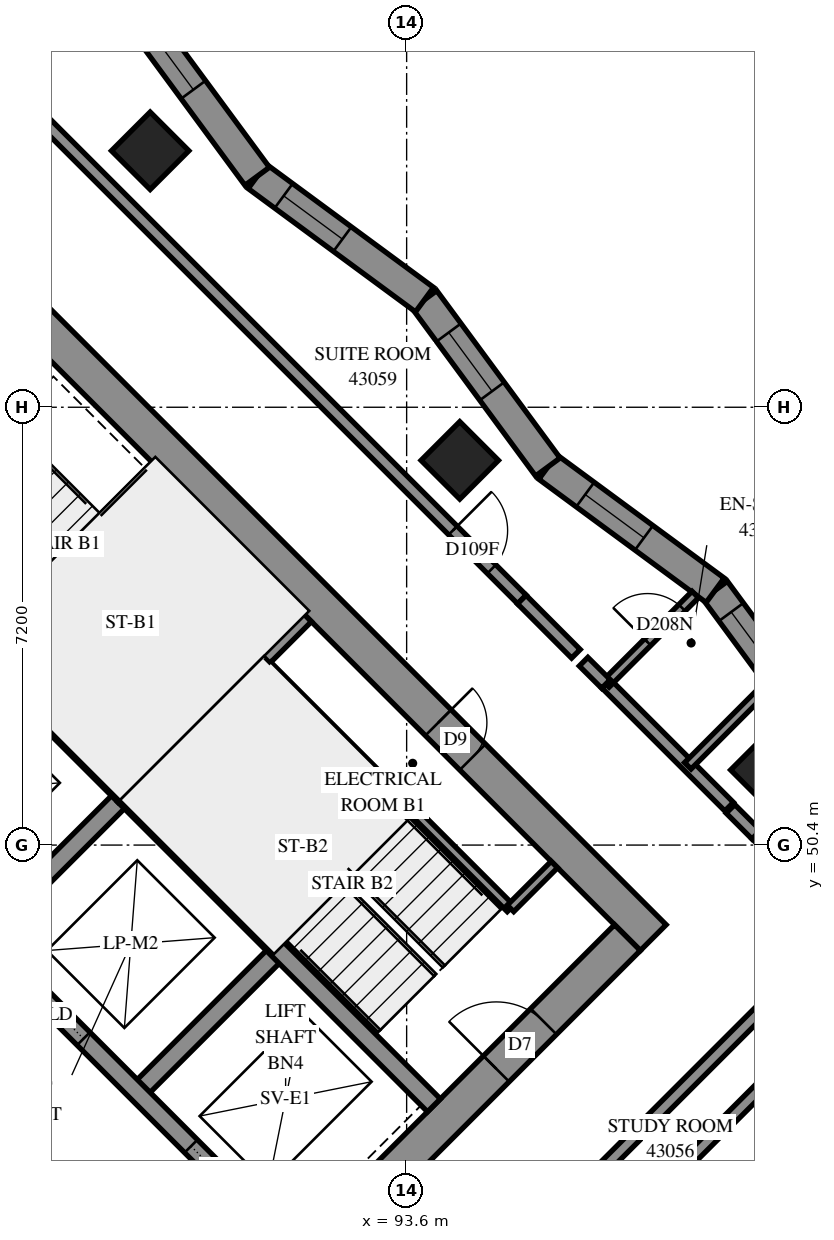
"""IFC4 building model, lengths in metres.
Left out: names, types, materials, properties, quantities, classifications, styles, units other than length and angle.
Written with IfcOpenShell. Run it as: python <this file> out.ifc"""

import sys

from ifc_helpers import new_model, si_unit, direction, frame, frame_2d, origin, origin_2d, place, context, subcontext, project, spatial, polyline, rectangle, outline, extrude, element, fill, save


model = new_model("IFC4")
c1 = context("Model", 3, precision=1e-05, world=origin(), true_north=direction((0.0, 1.0)))
c2 = subcontext(c1, "Body", "Model", "MODEL_VIEW")
j1 = project(units=[si_unit("LENGTHUNIT", "METRE"), si_unit("PLANEANGLEUNIT", "RADIAN")], contexts=[c1])
p1 = place(None, origin())
s1 = spatial("IfcSite", under=j1, at=p1, CompositionType="ELEMENT")
p2 = place(p1, origin())
s2 = spatial("IfcBuilding", under=s1, at=p2, CompositionType="ELEMENT")
p3 = place(p2, frame((0.0, 0.0, 159.2)))
s3 = spatial("IfcBuildingStorey", under=s2, at=p3, CompositionType="ELEMENT", Elevation=159.2)
for number, where, z_axis, x_axis in (
    (1, (89.382, 61.818, 0.0), (0.0, 0.0, 1.0), (0.707, -0.707, 0.0)),
    (2, (94.474, 56.727, 0.0), (0.0, 0.0, 1.0), (0.707, -0.707, 0.0)),
    (3, (99.565, 51.635, 0.0), (0.0, 0.0, 1.0), (0.707, -0.707, 0.0)),
):
    element("IfcColumn", number, at=place(p3, frame(where, z_axis=z_axis, x_axis=x_axis)), inside=s3, PredefinedType="COLUMN", context=c2, shape_type="SweptSolid", body=[
        extrude(rectangle(XDim=0.9, YDim=0.9, at=origin_2d()), origin(), (0.0, 0.0, 1.0), 3.1),
    ])
p4 = place(p3, frame((86.625, 59.908, -0.3), z_axis=(0.0, 0.0, 1.0), x_axis=(0.7071067812, -0.7071067812, 0.0)))
e4 = element("IfcWall", 4, at=p4, inside=s3, PredefinedType="SHEAR", context=c2, shape_type="SweptSolid", body=[
    extrude(rectangle(XDim=15.6, YDim=0.6, at=frame_2d((7.8, 0.0))), origin(), (0.0, 0.0, 1.0), 2.7),
])
p5 = place(p4, frame((10.6, 0.0, 0.3)))
e5 = element("IfcOpeningElement", 5, at=p5, cuts=e4, PredefinedType="OPENING", context=c2, shape_type="SweptSolid", body=[
    extrude(rectangle(XDim=0.8, YDim=2.1, at=frame_2d((0.4, 1.05))), frame((0.0, 0.31, 0.0), z_axis=(0.0, -1.0, 0.0), x_axis=(1.0, 0.0, 0.0)), (0.0, 0.0, 1.0), 0.62),
])
p6 = place(p3, frame((87.049, 38.695, -0.3), z_axis=(0.0, 0.0, 1.0), x_axis=(0.7071067812, 0.7071067812, 0.0)))
e6 = element("IfcWall", 6, at=p6, inside=s3, PredefinedType="SHEAR", context=c2, shape_type="SweptSolid", body=[
    extrude(rectangle(XDim=14.4, YDim=0.6, at=frame_2d((7.2, 0.0))), origin(), (0.0, 0.0, 1.0), 2.7),
])
p7 = place(p6, frame((4.55, 0.0, 0.3)))
e7 = element("IfcOpeningElement", 7, at=p7, cuts=e6, PredefinedType="OPENING", context=c2, shape_type="SweptSolid", body=[
    extrude(rectangle(XDim=1.1, YDim=2.1, at=frame_2d((0.55, 1.05))), frame((0.0, 0.31, 0.0), z_axis=(0.0, -1.0, 0.0), x_axis=(1.0, 0.0, 0.0)), (0.0, 0.0, 1.0), 0.62),
])
p8 = place(p6, frame((11.35, 0.0, 0.3)))
e8 = element("IfcOpeningElement", 8, at=p8, cuts=e6, PredefinedType="OPENING", context=c2, shape_type="SweptSolid", body=[
    extrude(rectangle(XDim=1.1, YDim=2.1, at=frame_2d((0.55, 1.05))), frame((0.0, 0.31, 0.0), z_axis=(0.0, -1.0, 0.0), x_axis=(1.0, 0.0, 0.0)), (0.0, 0.0, 1.0), 0.62),
])
for number, where, z_axis, x_axis in (
    (9, (86.625, 48.878, 0.0), (0.0, 0.0, 1.0), (0.707, 0.707, 0.0)),
    (10, (89.17, 46.332, 0.0), (0.0, 0.0, 1.0), (0.707, 0.707, 0.0)),
):
    element("IfcWall", number, at=place(p3, frame(where, z_axis=z_axis, x_axis=x_axis)), inside=s3, PredefinedType="SOLIDWALL", context=c2, shape_type="SweptSolid", body=[
        extrude(rectangle(XDim=3.3, YDim=0.3, at=frame_2d((1.65, 0.0))), origin(), (0.0, 0.0, 1.0), 3.1),
    ])
p9 = place(p3, frame((78.988, 51.423, 0.0), z_axis=(0.0, 0.0, 1.0), x_axis=(0.7071067812, -0.7071067812, 0.0)))
e11 = element("IfcWall", 11, at=p9, inside=s3, PredefinedType="SOLIDWALL", context=c2, shape_type="SweptSolid", body=[
    extrude(rectangle(XDim=14.4, YDim=0.3, at=frame_2d((7.2, 0.0))), origin(), (0.0, 0.0, 1.0), 3.1),
])
p10 = place(p9, frame((1.35, 0.0, 0.0)))
e12 = element("IfcOpeningElement", 12, at=p10, cuts=e11, PredefinedType="OPENING", context=c2, shape_type="SweptSolid", body=[
    extrude(rectangle(XDim=0.9, YDim=2.1, at=frame_2d((0.45, 1.05))), frame((0.0, 0.16, 0.0), z_axis=(0.0, -1.0, 0.0), x_axis=(1.0, 0.0, 0.0)), (0.0, 0.0, 1.0), 0.32),
])
p11 = place(p9, frame((4.95, 0.0, 0.0)))
e13 = element("IfcOpeningElement", 13, at=p11, cuts=e11, PredefinedType="OPENING", context=c2, shape_type="SweptSolid", body=[
    extrude(rectangle(XDim=0.9, YDim=2.1, at=frame_2d((0.45, 1.05))), frame((0.0, 0.16, 0.0), z_axis=(0.0, -1.0, 0.0), x_axis=(1.0, 0.0, 0.0)), (0.0, 0.0, 1.0), 0.32),
])
p12 = place(p9, frame((8.55, 0.0, 0.0)))
e14 = element("IfcOpeningElement", 14, at=p12, cuts=e11, PredefinedType="OPENING", context=c2, shape_type="SweptSolid", body=[
    extrude(rectangle(XDim=0.9, YDim=2.1, at=frame_2d((0.45, 1.05))), frame((0.0, 0.16, 0.0), z_axis=(0.0, -1.0, 0.0), x_axis=(1.0, 0.0, 0.0)), (0.0, 0.0, 1.0), 0.32),
])
p13 = place(p9, frame((12.05, 0.0, 0.0)))
e15 = element("IfcOpeningElement", 15, at=p13, cuts=e11, PredefinedType="OPENING", context=c2, shape_type="SweptSolid", body=[
    extrude(rectangle(XDim=1.1, YDim=2.1, at=frame_2d((0.55, 1.05))), frame((0.0, 0.16, 0.0), z_axis=(0.0, -1.0, 0.0), x_axis=(1.0, 0.0, 0.0)), (0.0, 0.0, 1.0), 0.32),
])
p14 = place(p3, frame((81.534, 53.969, 0.0), z_axis=(0.0, 0.0, 1.0), x_axis=(0.707103309, -0.7071102534, 0.0)))
e16 = element("IfcWall", 16, at=p14, inside=s3, PredefinedType="SOLIDWALL", context=c2, shape_type="SweptSolid", body=[
    extrude(rectangle(XDim=14.4, YDim=0.3, at=frame_2d((7.2, 0.0))), origin(), (0.0, 0.0, 1.0), 3.1),
])
p15 = place(p14, frame((1.25, 0.0, 0.0)))
e17 = element("IfcOpeningElement", 17, at=p15, cuts=e16, PredefinedType="OPENING", context=c2, shape_type="SweptSolid", body=[
    extrude(rectangle(XDim=1.1, YDim=2.1, at=frame_2d((0.55, 1.05))), frame((0.0, 0.16, 0.0), z_axis=(0.0, -1.0, 0.0), x_axis=(1.0, 0.0, 0.0)), (0.0, 0.0, 1.0), 0.32),
])
p16 = place(p14, frame((4.85, 0.0, 0.0)))
e18 = element("IfcOpeningElement", 18, at=p16, cuts=e16, PredefinedType="OPENING", context=c2, shape_type="SweptSolid", body=[
    extrude(rectangle(XDim=1.1, YDim=2.1, at=frame_2d((0.55, 1.05))), frame((0.0, 0.16, 0.0), z_axis=(0.0, -1.0, 0.0), x_axis=(1.0, 0.0, 0.0)), (0.0, 0.0, 1.0), 0.32),
])
p17 = place(p14, frame((8.45, 0.0, 0.0)))
e19 = element("IfcOpeningElement", 19, at=p17, cuts=e16, PredefinedType="OPENING", context=c2, shape_type="SweptSolid", body=[
    extrude(rectangle(XDim=1.1, YDim=2.1, at=frame_2d((0.55, 1.05))), frame((0.0, 0.16, 0.0), z_axis=(0.0, -1.0, 0.0), x_axis=(1.0, 0.0, 0.0)), (0.0, 0.0, 1.0), 0.32),
])
p18 = place(p14, frame((12.05, 0.0, 0.0)))
e20 = element("IfcOpeningElement", 20, at=p18, cuts=e16, PredefinedType="OPENING", context=c2, shape_type="SweptSolid", body=[
    extrude(rectangle(XDim=1.1, YDim=2.1, at=frame_2d((0.55, 1.05))), frame((0.0, 0.16, 0.0), z_axis=(0.0, -1.0, 0.0), x_axis=(1.0, 0.0, 0.0)), (0.0, 0.0, 1.0), 0.32),
])
for number, where, z_axis, x_axis in (
    (21, (83.867, 56.302, 0.0), (0.0, 0.0, 1.0), (0.707, -0.707, 0.0)),
    (22, (88.958, 51.211, 0.0), (0.0, 0.0, 1.0), (0.707, -0.707, 0.0)),
):
    element("IfcWall", number, at=place(p3, frame(where, z_axis=z_axis, x_axis=x_axis)), inside=s3, PredefinedType="SOLIDWALL", context=c2, shape_type="SweptSolid", body=[
        extrude(rectangle(XDim=7.2, YDim=0.3, at=frame_2d((3.6, 0.0))), origin(), (0.0, 0.0, 1.0), 3.1),
    ])
p19 = place(p3, frame((88.958, 51.211, 0.0), z_axis=(0.0, 0.0, 1.0), x_axis=(0.7071067812, 0.7071067812, 0.0)))
e23 = element("IfcWall", 23, at=p19, inside=s3, PredefinedType="SOLIDWALL", context=c2, shape_type="SweptSolid", body=[
    extrude(rectangle(XDim=4.2, YDim=0.3, at=frame_2d((2.1, 0.0))), origin(), (0.0, 0.0, 1.0), 3.1),
])
p20 = place(p3, frame((100.702, 51.838, 0.0), z_axis=(0.0, 0.0, 1.0), x_axis=(-0.5932199928, 0.8050403966, 0.0)))
e24 = element("IfcWall", 24, at=p20, inside=s3, PredefinedType="SOLIDWALL", context=c2, shape_type="SweptSolid", body=[
    extrude(outline(polyline([(0.038, -0.25), (3.456, -0.25), (3.381, 0.25), (-0.038, 0.25), (0.038, -0.25)])), origin(), (0.0, 0.0, 1.0), 3.1),
])
p21 = place(p20, frame((1.774, 0.0, 0.45)))
e25 = element("IfcOpeningElement", 25, at=p21, cuts=e24, PredefinedType="OPENING", context=c2, shape_type="SweptSolid", body=[
    extrude(rectangle(XDim=1.2, YDim=2.5, at=frame_2d((0.6, 1.25))), frame((0.0, 0.26, 0.0), z_axis=(0.0, -1.0, 0.0), x_axis=(1.0, 0.0, 0.0)), (0.0, 0.0, 1.0), 0.52),
])
p22 = place(p3, frame((98.674, 54.59, 0.0), z_axis=(0.0, 0.0, 1.0), x_axis=(-0.8050440725, 0.5932150043, 0.0)))
e26 = element("IfcWall", 26, at=p22, inside=s3, PredefinedType="SOLIDWALL", context=c2, shape_type="SweptSolid", body=[
    extrude(outline(polyline([(-0.038, -0.25), (3.381, -0.25), (3.456, 0.25), (0.038, 0.25), (-0.038, -0.25)])), origin(), (0.0, 0.0, 1.0), 3.1),
])
p23 = place(p22, frame((1.455, 0.0, 0.45)))
e27 = element("IfcOpeningElement", 27, at=p23, cuts=e26, PredefinedType="OPENING", context=c2, shape_type="SweptSolid", body=[
    extrude(rectangle(XDim=1.2, YDim=2.5, at=frame_2d((0.6, 1.25))), frame((0.0, 0.26, 0.0), z_axis=(0.0, -1.0, 0.0), x_axis=(1.0, 0.0, 0.0)), (0.0, 0.0, 1.0), 0.52),
])
p24 = place(p3, frame((95.922, 56.618, 0.0), z_axis=(0.0, 0.0, 1.0), x_axis=(-0.5932150043, 0.8050440725, 0.0)))
e28 = element("IfcWall", 28, at=p24, inside=s3, PredefinedType="SOLIDWALL", context=c2, shape_type="SweptSolid", body=[
    extrude(outline(polyline([(0.038, -0.25), (3.456, -0.25), (3.381, 0.25), (-0.038, 0.25), (0.038, -0.25)])), origin(), (0.0, 0.0, 1.0), 3.1),
])
p25 = place(p24, frame((1.547, 0.0, 0.45)))
e29 = element("IfcOpeningElement", 29, at=p25, cuts=e28, PredefinedType="OPENING", context=c2, shape_type="SweptSolid", body=[
    extrude(rectangle(XDim=1.2, YDim=2.5, at=frame_2d((0.6, 1.25))), frame((0.0, 0.26, 0.0), z_axis=(0.0, -1.0, 0.0), x_axis=(1.0, 0.0, 0.0)), (0.0, 0.0, 1.0), 0.52),
])
p26 = place(p3, frame((93.894, 59.37, 0.0), z_axis=(0.0, 0.0, 1.0), x_axis=(-0.8050403966, 0.5932199928, 0.0)))
e30 = element("IfcWall", 30, at=p26, inside=s3, PredefinedType="SOLIDWALL", context=c2, shape_type="SweptSolid", body=[
    extrude(outline(polyline([(-0.038, -0.25), (3.381, -0.25), (3.456, 0.25), (0.038, 0.25), (-0.038, -0.25)])), origin(), (0.0, 0.0, 1.0), 3.1),
])
p27 = place(p26, frame((1.677, 0.0, 0.45)))
e31 = element("IfcOpeningElement", 31, at=p27, cuts=e30, PredefinedType="OPENING", context=c2, shape_type="SweptSolid", body=[
    extrude(rectangle(XDim=1.2, YDim=2.5, at=frame_2d((0.6, 1.25))), frame((0.0, 0.26, 0.0), z_axis=(0.0, -1.0, 0.0), x_axis=(1.0, 0.0, 0.0)), (0.0, 0.0, 1.0), 0.52),
])
p28 = place(p3, frame((91.142, 61.398, 0.0), z_axis=(0.0, 0.0, 1.0), x_axis=(-0.5932150043, 0.8050440725, 0.0)))
e32 = element("IfcWall", 32, at=p28, inside=s3, PredefinedType="SOLIDWALL", context=c2, shape_type="SweptSolid", body=[
    extrude(outline(polyline([(0.038, -0.25), (3.456, -0.25), (3.381, 0.25), (-0.038, 0.25), (0.038, -0.25)])), origin(), (0.0, 0.0, 1.0), 3.1),
])
p29 = place(p28, frame((1.77, 0.0, 0.45)))
e33 = element("IfcOpeningElement", 33, at=p29, cuts=e32, PredefinedType="OPENING", context=c2, shape_type="SweptSolid", body=[
    extrude(rectangle(XDim=1.2, YDim=2.5, at=frame_2d((0.6, 1.25))), frame((0.0, 0.26, 0.0), z_axis=(0.0, -1.0, 0.0), x_axis=(1.0, 0.0, 0.0)), (0.0, 0.0, 1.0), 0.52),
])
p30 = place(p3, frame((91.313, 53.354, 0.0), z_axis=(0.0, 0.0, 1.0), x_axis=(0.7071067812, -0.7071067812, 0.0)))
e34 = element("IfcWall", 34, at=p30, inside=s3, PredefinedType="PARTITIONING", context=c2, shape_type="SweptSolid", body=[
    extrude(rectangle(XDim=5.65, YDim=0.15, at=frame_2d((2.825, 0.0))), origin(), (0.0, 0.0, 1.0), 3.1),
])
p31 = place(p3, frame((95.308, 49.358, 0.0), z_axis=(0.0, 0.0, 1.0), x_axis=(0.70705776, 0.707155799, 0.0)))
e35 = element("IfcWall", 35, at=p31, inside=s3, PredefinedType="PARTITIONING", context=c2, shape_type="SweptSolid", body=[
    extrude(rectangle(XDim=1.02, YDim=0.15, at=frame_2d((0.51, 0.0))), origin(), (0.0, 0.0, 1.0), 3.1),
])
p32 = place(p3, frame((86.841, 63.093, 0.0), z_axis=(0.0, 0.0, 1.0), x_axis=(0.7071067812, -0.7071067812, 0.0)))
e36 = element("IfcWall", 36, at=p32, inside=s3, PredefinedType="PARTITIONING", context=c2, shape_type="SweptSolid", body=[
    extrude(rectangle(XDim=12.239, YDim=0.2, at=frame_2d((6.119, 0.0))), origin(), (0.0, 0.0, 1.0), 3.1),
])
p33 = place(p32, frame((10.634, 0.0, 0.0)))
e37 = element("IfcOpeningElement", 37, at=p33, cuts=e36, PredefinedType="OPENING", context=c2, shape_type="SweptSolid", body=[
    extrude(rectangle(XDim=0.9, YDim=2.1, at=frame_2d((0.45, 1.05))), frame((0.0, 0.11, 0.0), z_axis=(0.0, -1.0, 0.0), x_axis=(1.0, 0.0, 0.0)), (0.0, 0.0, 1.0), 0.22),
])
p34 = place(p3, frame((94.401, 41.383, 0.0), z_axis=(0.0, 0.0, 1.0), x_axis=(0.7071067812, 0.7071067812, 0.0)))
e38 = element("IfcWall", 38, at=p34, inside=s3, PredefinedType="PARTITIONING", context=c2, shape_type="SweptSolid", body=[
    extrude(rectangle(XDim=12.04, YDim=0.2, at=frame_2d((6.02, 0.0))), origin(), (0.0, 0.0, 1.0), 3.1),
])
p35 = place(p3, frame((93.767, 42.021, 0.0), z_axis=(0.0, 0.0, 1.0), x_axis=(0.7071067812, 0.7071067812, 0.0)))
e39 = element("IfcWall", 39, at=p35, inside=s3, PredefinedType="PARTITIONING", context=c2, shape_type="SweptSolid", body=[
    extrude(rectangle(XDim=9.998, YDim=0.2, at=frame_2d((4.999, 0.0))), origin(), (0.0, 0.0, 1.0), 3.1),
])
p36 = place(p35, frame((0.196, 0.0, 0.0)))
e40 = element("IfcOpeningElement", 40, at=p36, cuts=e39, PredefinedType="OPENING", context=c2, shape_type="SweptSolid", body=[
    extrude(rectangle(XDim=1.0, YDim=2.1, at=frame_2d((0.5, 1.05))), frame((0.0, 0.11, 0.0), z_axis=(0.0, -1.0, 0.0), x_axis=(1.0, 0.0, 0.0)), (0.0, 0.0, 1.0), 0.22),
])
p37 = place(p3, frame((96.882, 53.053, 0.0), z_axis=(0.0, 0.0, 1.0), x_axis=(0.7071067812, -0.7071067812, 0.0)))
e41 = element("IfcWall", 41, at=p37, inside=s3, PredefinedType="PARTITIONING", context=c2, shape_type="SweptSolid", body=[
    extrude(rectangle(XDim=2.86, YDim=0.2, at=frame_2d((1.43, 0.0))), origin(), (0.0, 0.0, 1.0), 3.1),
])
p38 = place(p3, frame((99.352, 50.574, 0.0), z_axis=(0.0, 0.0, 1.0), x_axis=(0.7075827869, -0.7066304548, 0.0)))
e42 = element("IfcWall", 42, at=p38, inside=s3, PredefinedType="PARTITIONING", context=c2, shape_type="SweptSolid", body=[
    extrude(rectangle(XDim=2.1, YDim=0.2, at=frame_2d((1.05, 0.0))), origin(), (0.0, 0.0, 1.0), 3.1),
])
p39 = place(p3, frame((96.877, 53.051, 0.0), z_axis=(0.0, 0.0, 1.0), x_axis=(0.7071067812, 0.7071067812, 0.0)))
e43 = element("IfcWall", 43, at=p39, inside=s3, PredefinedType="PARTITIONING", context=c2, shape_type="SweptSolid", body=[
    extrude(rectangle(XDim=2.078, YDim=0.15, at=frame_2d((1.039, 0.0))), origin(), (0.0, 0.0, 1.0), 3.1),
])
p40 = place(p39, frame((0.969, 0.0, 0.0)))
e44 = element("IfcOpeningElement", 44, at=p40, cuts=e43, PredefinedType="OPENING", context=c2, shape_type="SweptSolid", body=[
    extrude(rectangle(XDim=0.8, YDim=2.1, at=frame_2d((0.4, 1.05))), frame((0.0, 0.085, 0.0), z_axis=(0.0, -1.0, 0.0), x_axis=(1.0, 0.0, 0.0)), (0.0, 0.0, 1.0), 0.17),
])
p41 = place(p3, frame((98.224, 51.704, 0.0), z_axis=(0.0, 0.0, 1.0), x_axis=(0.7065103186, 0.7077027411, 0.0)))
e45 = element("IfcWall", 45, at=p41, inside=s3, PredefinedType="PARTITIONING", context=c2, shape_type="SweptSolid", body=[
    extrude(rectangle(XDim=1.845, YDim=0.15, at=frame_2d((0.922, 0.0))), origin(), (0.0, 0.0, 1.0), 3.1),
])
p42 = place(p3, frame((95.494, 54.438, 0.0), z_axis=(0.0, 0.0, 1.0), x_axis=(0.706312726, -0.7078999456, 0.0)))
e46 = element("IfcWall", 46, at=p42, inside=s3, PredefinedType="PARTITIONING", context=c2, shape_type="SweptSolid", body=[
    extrude(rectangle(XDim=1.26, YDim=0.2, at=frame_2d((0.63, 0.0))), origin(), (0.0, 0.0, 1.0), 3.1),
])
p43 = place(p3, frame((98.925, 50.995, 0.0), z_axis=(0.0, 0.0, 1.0), x_axis=(0.7071067812, -0.7071067812, 0.0)))
e47 = element("IfcWall", 47, at=p43, inside=s3, PredefinedType="PARTITIONING", context=c2, shape_type="SweptSolid", body=[
    extrude(rectangle(XDim=0.6, YDim=0.2, at=frame_2d((0.3, 0.0))), origin(), (0.0, 0.0, 1.0), 3.1),
])
p44 = place(p3, frame((96.51, 53.416, 0.0), z_axis=(0.0, 0.0, 1.0), x_axis=(0.7090308706, -0.7051774419, 0.0)))
e48 = element("IfcWall", 48, at=p44, inside=s3, PredefinedType="PARTITIONING", context=c2, shape_type="SweptSolid", body=[
    extrude(rectangle(XDim=0.519, YDim=0.2, at=frame_2d((0.26, 0.0))), origin(), (0.0, 0.0, 1.0), 3.1),
])
p45 = place(p21, origin())
e49 = element("IfcWindow", 49, at=p45, inside=s3, PartitioningType="SINGLE_PANEL", PredefinedType="WINDOW", context=c2, shape_type="SweptSolid", body=[
    extrude(rectangle(XDim=1.2, YDim=2.5, at=frame_2d((0.6, 1.25))), frame((0.0, 0.18, 0.0), z_axis=(0.0, -1.0, 0.0), x_axis=(1.0, 0.0, 0.0)), (0.0, 0.0, 1.0), 0.06),
])
fill(e25, e49)
p46 = place(p23, origin())
e50 = element("IfcWindow", 50, at=p46, inside=s3, PartitioningType="SINGLE_PANEL", PredefinedType="WINDOW", context=c2, shape_type="SweptSolid", body=[
    extrude(rectangle(XDim=1.2, YDim=2.5, at=frame_2d((0.6, 1.25))), frame((0.0, 0.18, 0.0), z_axis=(0.0, -1.0, 0.0), x_axis=(1.0, 0.0, 0.0)), (0.0, 0.0, 1.0), 0.06),
])
fill(e27, e50)
p47 = place(p25, origin())
e51 = element("IfcWindow", 51, at=p47, inside=s3, PartitioningType="SINGLE_PANEL", PredefinedType="WINDOW", context=c2, shape_type="SweptSolid", body=[
    extrude(rectangle(XDim=1.2, YDim=2.5, at=frame_2d((0.6, 1.25))), frame((0.0, 0.18, 0.0), z_axis=(0.0, -1.0, 0.0), x_axis=(1.0, 0.0, 0.0)), (0.0, 0.0, 1.0), 0.06),
])
fill(e29, e51)
p48 = place(p27, origin())
e52 = element("IfcWindow", 52, at=p48, inside=s3, PartitioningType="SINGLE_PANEL", PredefinedType="WINDOW", context=c2, shape_type="SweptSolid", body=[
    extrude(rectangle(XDim=1.2, YDim=2.5, at=frame_2d((0.6, 1.25))), frame((0.0, 0.18, 0.0), z_axis=(0.0, -1.0, 0.0), x_axis=(1.0, 0.0, 0.0)), (0.0, 0.0, 1.0), 0.06),
])
fill(e31, e52)
p49 = place(p29, origin())
e53 = element("IfcWindow", 53, at=p49, inside=s3, PartitioningType="SINGLE_PANEL", PredefinedType="WINDOW", context=c2, shape_type="SweptSolid", body=[
    extrude(rectangle(XDim=1.2, YDim=2.5, at=frame_2d((0.6, 1.25))), frame((0.0, 0.18, 0.0), z_axis=(0.0, -1.0, 0.0), x_axis=(1.0, 0.0, 0.0)), (0.0, 0.0, 1.0), 0.06),
])
fill(e33, e53)
p50 = place(p5, origin())
e54 = element("IfcDoor", 54, at=p50, inside=s3, OperationType="SINGLE_SWING_RIGHT", PredefinedType="DOOR", context=c2, shape_type="SweptSolid", body=[
    extrude(rectangle(XDim=0.8, YDim=2.1, at=frame_2d((0.4, 1.05))), frame((0.0, 0.025, 0.0), z_axis=(0.0, -1.0, 0.0), x_axis=(1.0, 0.0, 0.0)), (0.0, 0.0, 1.0), 0.05),
])
fill(e5, e54)
p51 = place(p8, origin())
e55 = element("IfcDoor", 55, at=p51, inside=s3, OperationType="SINGLE_SWING_RIGHT", PredefinedType="DOOR", context=c2, shape_type="SweptSolid", body=[
    extrude(rectangle(XDim=1.1, YDim=2.1, at=frame_2d((0.55, 1.05))), frame((0.0, 0.025, 0.0), z_axis=(0.0, -1.0, 0.0), x_axis=(1.0, 0.0, 0.0)), (0.0, 0.0, 1.0), 0.05),
])
fill(e8, e55)
p52 = place(p17, origin())
e56 = element("IfcDoor", 56, at=p52, inside=s3, OperationType="SLIDING_TO_LEFT", PredefinedType="DOOR", context=c2, shape_type="SweptSolid", body=[
    extrude(rectangle(XDim=1.1, YDim=2.1, at=frame_2d((0.55, 1.05))), frame((0.0, 0.025, 0.0), z_axis=(0.0, -1.0, 0.0), x_axis=(1.0, 0.0, 0.0)), (0.0, 0.0, 1.0), 0.05),
])
fill(e19, e56)
p53 = place(p18, origin())
e57 = element("IfcDoor", 57, at=p53, inside=s3, OperationType="SLIDING_TO_RIGHT", PredefinedType="DOOR", context=c2, shape_type="SweptSolid", body=[
    extrude(rectangle(XDim=1.1, YDim=2.1, at=frame_2d((0.55, 1.05))), frame((0.0, 0.025, 0.0), z_axis=(0.0, -1.0, 0.0), x_axis=(1.0, 0.0, 0.0)), (0.0, 0.0, 1.0), 0.05),
])
fill(e20, e57)
p54 = place(p33, origin())
e58 = element("IfcDoor", 58, at=p54, inside=s3, OperationType="SINGLE_SWING_LEFT", PredefinedType="DOOR", context=c2, shape_type="SweptSolid", body=[
    extrude(rectangle(XDim=0.9, YDim=2.1, at=frame_2d((0.45, 1.05))), frame((0.0, 0.025, 0.0), z_axis=(0.0, -1.0, 0.0), x_axis=(1.0, 0.0, 0.0)), (0.0, 0.0, 1.0), 0.05),
])
fill(e37, e58)
p55 = place(p40, origin())
e59 = element("IfcDoor", 59, at=p55, inside=s3, OperationType="SINGLE_SWING_RIGHT", PredefinedType="DOOR", context=c2, shape_type="SweptSolid", body=[
    extrude(rectangle(XDim=0.8, YDim=2.1, at=frame_2d((0.4, 1.05))), frame((0.0, 0.025, 0.0), z_axis=(0.0, -1.0, 0.0), x_axis=(1.0, 0.0, 0.0)), (0.0, 0.0, 1.0), 0.05),
])
fill(e44, e59)
save(model, sys.argv[1])
